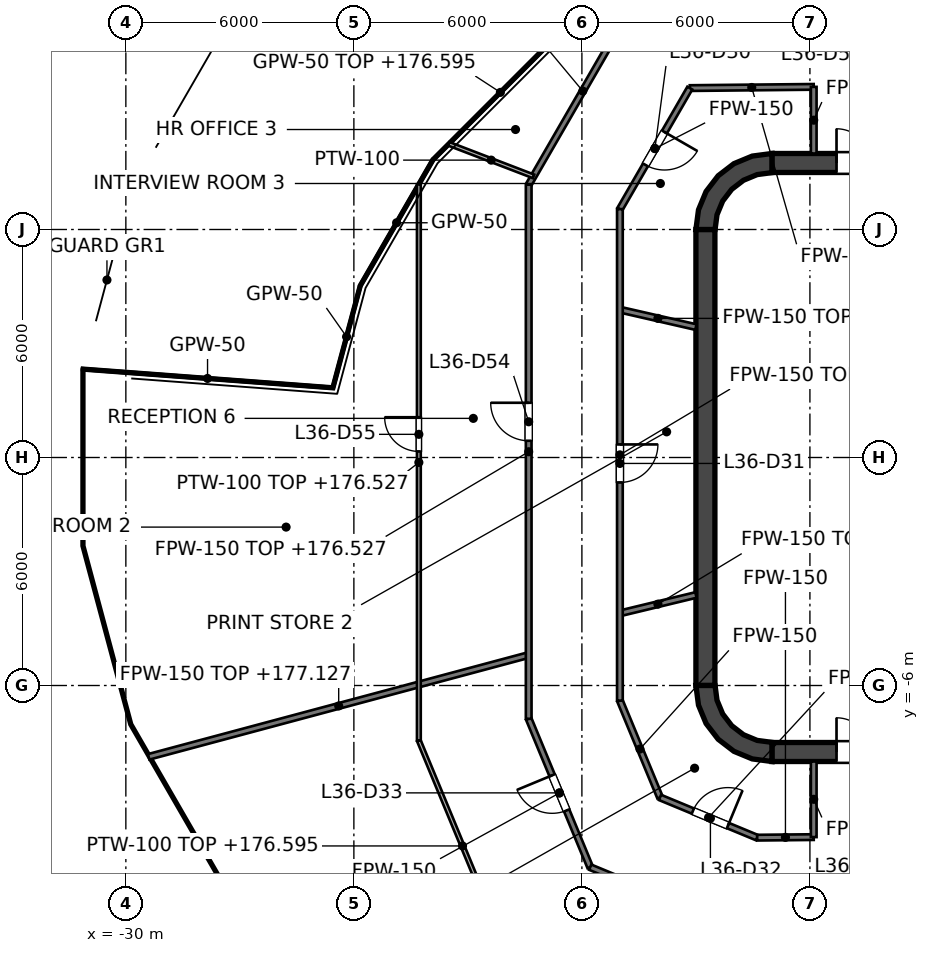
"""IFC4 building model, lengths in metres.
Left out: names, types, materials, properties, quantities, classifications, styles, units other than length and angle.
Written with IfcOpenShell. Run it as: python <this file> out.ifc"""

import sys

from ifc_helpers import new_model, si_unit, direction, frame, frame_2d, origin, place, context, subcontext, project, spatial, polyline, rectangle, outline, extrude, element, fill, save


model = new_model("IFC4")
c1 = context("Model", 3, precision=1e-05, world=origin(), true_north=direction((0.0, 1.0)))
c2 = subcontext(c1, "Body", "Model", "MODEL_VIEW")
j1 = project(units=[si_unit("LENGTHUNIT", "METRE"), si_unit("PLANEANGLEUNIT", "RADIAN")], contexts=[c1])
p1 = place(None, origin())
s1 = spatial("IfcSite", under=j1, at=p1, CompositionType="ELEMENT")
p2 = place(p1, origin())
s2 = spatial("IfcBuilding", under=s1, at=p2, CompositionType="ELEMENT")
p3 = place(p2, frame((0.0, 0.0, 173.6)))
s3 = spatial("IfcBuildingStorey", under=s2, at=p3, CompositionType="ELEMENT", Elevation=173.6)
p4 = place(p3, frame((-13.0, 7.75, 0.0), z_axis=(0.0, 0.0, 1.0), x_axis=(1.0, 0.0, 0.0)))
e1 = element("IfcWall", 1, at=p4, inside=s3, PredefinedType="SHEAR", context=c2, shape_type="SweptSolid", body=[
    extrude(rectangle(XDim=26.0, YDim=0.5, at=frame_2d((13.0, 0.0))), origin(), (0.0, 0.0, 1.0), 4.0),
])
p5 = place(p4, frame((1.7, 0.0, 0.0)))
e2 = element("IfcOpeningElement", 2, at=p5, cuts=e1, PredefinedType="OPENING", context=c2, shape_type="SweptSolid", body=[
    extrude(rectangle(XDim=1.8, YDim=2.1, at=frame_2d((0.9, 1.05))), frame((0.0, 0.25, 0.0), z_axis=(0.0, -1.0, 0.0), x_axis=(1.0, 0.0, 0.0)), (0.0, 0.0, 1.0), 0.5),
])
p6 = place(p4, frame((22.5, 0.0, 0.0)))
e3 = element("IfcOpeningElement", 3, at=p6, cuts=e1, PredefinedType="OPENING", context=c2, shape_type="SweptSolid", body=[
    extrude(rectangle(XDim=1.8, YDim=2.1, at=frame_2d((0.9, 1.05))), frame((0.0, 0.25, 0.0), z_axis=(0.0, -1.0, 0.0), x_axis=(1.0, 0.0, 0.0)), (0.0, 0.0, 1.0), 0.5),
])
p7 = place(p3, frame((-13.0, -7.75, 0.0), z_axis=(0.0, 0.0, 1.0), x_axis=(1.0, 0.0, 0.0)))
e4 = element("IfcWall", 4, at=p7, inside=s3, PredefinedType="SHEAR", context=c2, shape_type="SweptSolid", body=[
    extrude(rectangle(XDim=26.0, YDim=0.5, at=frame_2d((13.0, 0.0))), origin(), (0.0, 0.0, 1.0), 4.0),
])
p8 = place(p7, frame((1.7, 0.0, 0.0)))
e5 = element("IfcOpeningElement", 5, at=p8, cuts=e4, PredefinedType="OPENING", context=c2, shape_type="SweptSolid", body=[
    extrude(rectangle(XDim=1.8, YDim=2.1, at=frame_2d((0.9, 1.05))), frame((0.0, 0.25, 0.0), z_axis=(0.0, -1.0, 0.0), x_axis=(1.0, 0.0, 0.0)), (0.0, 0.0, 1.0), 0.5),
])
p9 = place(p7, frame((22.5, 0.0, 0.0)))
e6 = element("IfcOpeningElement", 6, at=p9, cuts=e4, PredefinedType="OPENING", context=c2, shape_type="SweptSolid", body=[
    extrude(rectangle(XDim=1.8, YDim=2.1, at=frame_2d((0.9, 1.05))), frame((0.0, 0.25, 0.0), z_axis=(0.0, -1.0, 0.0), x_axis=(1.0, 0.0, 0.0)), (0.0, 0.0, 1.0), 0.5),
])
p10 = place(p3, frame((-14.75, -6.0, 0.0), z_axis=(0.0, 0.0, 1.0), x_axis=(0.0, 1.0, 0.0)))
e7 = element("IfcWall", 7, at=p10, inside=s3, PredefinedType="SHEAR", context=c2, shape_type="SweptSolid", body=[
    extrude(rectangle(XDim=12.0, YDim=0.5, at=frame_2d((6.0, 0.0))), origin(), (0.0, 0.0, 1.0), 4.0),
])
p11 = place(p3, origin())
e8 = element("IfcWall", 8, at=p11, inside=s3, PredefinedType="SHEAR", context=c2, shape_type="SweptSolid", body=[
    extrude(outline(polyline([(-15.0, 6.0), (-14.496, 6.0), (-14.445, 6.387), (-14.295, 6.748), (-14.058, 7.058), (-13.748, 7.295), (-13.387, 7.445), (-13.0, 7.496), (-13.0, 8.0), (-13.518, 7.932), (-14.0, 7.732), (-14.414, 7.414), (-14.732, 7.0), (-14.932, 6.518), (-15.0, 6.0)])), origin(), (0.0, 0.0, 1.0), 4.0),
])
e9 = element("IfcWall", 9, at=p11, inside=s3, PredefinedType="SHEAR", context=c2, shape_type="SweptSolid", body=[
    extrude(outline(polyline([(-13.0, -8.0), (-13.0, -7.496), (-13.387, -7.445), (-13.748, -7.295), (-14.058, -7.058), (-14.295, -6.748), (-14.445, -6.387), (-14.496, -6.0), (-15.0, -6.0), (-14.932, -6.518), (-14.732, -7.0), (-14.414, -7.414), (-14.0, -7.732), (-13.518, -7.932), (-13.0, -8.0)])), origin(), (0.0, 0.0, 1.0), 4.0),
])
p12 = place(p3, frame((-11.8, -7.5, 0.0), z_axis=(0.0, 0.0, 1.0), x_axis=(0.0, 1.0, 0.0)))
e10 = element("IfcWall", 10, at=p12, inside=s3, PredefinedType="SOLIDWALL", context=c2, shape_type="SweptSolid", body=[
    extrude(rectangle(XDim=15.0, YDim=0.4, at=frame_2d((7.5, 0.0))), origin(), (0.0, 0.0, 1.0), 3.85),
])
p13 = place(p12, frame((11.3, 0.0, 0.0)))
e11 = element("IfcOpeningElement", 11, at=p13, cuts=e10, PredefinedType="OPENING", context=c2, shape_type="SweptSolid", body=[
    extrude(rectangle(XDim=1.1, YDim=2.1, at=frame_2d((0.55, 1.05))), frame((0.0, 0.2, 0.0), z_axis=(0.0, -1.0, 0.0), x_axis=(1.0, 0.0, 0.0)), (0.0, 0.0, 1.0), 0.4),
])
p14 = place(p12, frame((8.4, 0.0, 0.0)))
e12 = element("IfcOpeningElement", 12, at=p14, cuts=e10, PredefinedType="OPENING", context=c2, shape_type="SweptSolid", body=[
    extrude(rectangle(XDim=1.1, YDim=2.1, at=frame_2d((0.55, 1.05))), frame((0.0, 0.2, 0.0), z_axis=(0.0, -1.0, 0.0), x_axis=(1.0, 0.0, 0.0)), (0.0, 0.0, 1.0), 0.4),
])
p15 = place(p12, frame((5.5, 0.0, 0.0)))
e13 = element("IfcOpeningElement", 13, at=p15, cuts=e10, PredefinedType="OPENING", context=c2, shape_type="SweptSolid", body=[
    extrude(rectangle(XDim=1.1, YDim=2.1, at=frame_2d((0.55, 1.05))), frame((0.0, 0.2, 0.0), z_axis=(0.0, -1.0, 0.0), x_axis=(1.0, 0.0, 0.0)), (0.0, 0.0, 1.0), 0.4),
])
p16 = place(p12, frame((13.697, 0.0, 0.0)))
e14 = element("IfcOpeningElement", 14, at=p16, cuts=e10, PredefinedType="OPENING", context=c2, shape_type="SweptSolid", body=[
    extrude(rectangle(XDim=0.9, YDim=2.1, at=frame_2d((0.45, 1.05))), frame((0.0, 0.2, 0.0), z_axis=(0.0, -1.0, 0.0), x_axis=(1.0, 0.0, 0.0)), (0.0, 0.0, 1.0), 0.4),
])
p17 = place(p12, frame((0.403, 0.0, 0.0)))
e15 = element("IfcOpeningElement", 15, at=p17, cuts=e10, PredefinedType="OPENING", context=c2, shape_type="SweptSolid", body=[
    extrude(rectangle(XDim=0.9, YDim=2.1, at=frame_2d((0.45, 1.05))), frame((0.0, 0.2, 0.0), z_axis=(0.0, -1.0, 0.0), x_axis=(1.0, 0.0, 0.0)), (0.0, 0.0, 1.0), 0.4),
])
e16 = element("IfcWall", 16, at=p11, inside=s3, PredefinedType="SOLIDWALL", context=c2, shape_type="SweptSolid", body=[
    extrude(outline(polyline([(-12.0, -5.925), (-12.0, -5.675), (-14.25, -5.675), (-14.25, -3.025), (-12.0, -3.025), (-12.0, -2.775), (-14.25, -2.775), (-14.25, -0.125), (-12.0, -0.125), (-12.0, 0.125), (-14.25, 0.125), (-14.25, 2.775), (-12.0, 2.775), (-12.0, 3.025), (-14.25, 3.025), (-14.25, 5.675), (-12.0, 5.675), (-12.0, 5.925), (-14.25, 5.925), (-14.5, 5.925), (-14.5, 5.675), (-14.5, 3.025), (-14.5, 2.775), (-14.5, 0.125), (-14.5, -0.125), (-14.5, -2.775), (-14.5, -3.025), (-14.5, -5.675), (-14.5, -5.925), (-14.25, -5.925), (-12.0, -5.925)])), origin(), (0.0, 0.0, 1.0), 3.85),
])
p18 = place(p3, frame((-19.4, -6.876, 0.0), z_axis=(0.0, 0.0, 1.0), x_axis=(0.382843135608, -0.92381336509, 0.0)))
e17 = element("IfcWall", 17, at=p18, inside=s3, PredefinedType="PARTITIONING", context=c2, shape_type="SweptSolid", body=[
    extrude(rectangle(XDim=4.227, YDim=0.15, at=frame_2d((2.114, 0.0))), origin(), (0.0, 0.0, 1.0), 2.995),
])
p19 = place(p18, frame((1.61, 0.0, 0.0)))
e18 = element("IfcOpeningElement", 18, at=p19, cuts=e17, PredefinedType="OPENING", context=c2, shape_type="SweptSolid", body=[
    extrude(rectangle(XDim=1.0, YDim=2.1, at=frame_2d((0.5, 1.05))), frame((0.0, 0.075, 0.0), z_axis=(0.0, -1.0, 0.0), x_axis=(1.0, 0.0, 0.0)), (0.0, 0.0, 1.0), 0.15),
])
p20 = place(p3, frame((-17.0, -6.398, 0.0), z_axis=(0.0, 0.0, 1.0), x_axis=(0.382828866893, -0.923819278146, 0.0)))
e19 = element("IfcWall", 19, at=p20, inside=s3, PredefinedType="PARTITIONING", context=c2, shape_type="SweptSolid", body=[
    extrude(rectangle(XDim=2.757, YDim=0.15, at=frame_2d((1.378, 0.0))), origin(), (0.0, 0.0, 1.0), 2.995),
])
p21 = place(p3, frame((-17.781, -10.781, 0.0), z_axis=(0.0, 0.0, 1.0), x_axis=(0.923785728675, -0.3829098164, 0.0)))
e20 = element("IfcWall", 20, at=p21, inside=s3, PredefinedType="PARTITIONING", context=c2, shape_type="SweptSolid", body=[
    extrude(rectangle(XDim=4.25, YDim=0.15, at=frame_2d((2.125, 0.0))), origin(), (0.0, 0.0, 1.0), 2.995),
])
p22 = place(p3, frame((-15.945, -8.945, 0.0), z_axis=(0.0, 0.0, 1.0), x_axis=(0.92378777743, -0.382904873658, 0.0)))
e21 = element("IfcWall", 21, at=p22, inside=s3, PredefinedType="PARTITIONING", context=c2, shape_type="SweptSolid", body=[
    extrude(rectangle(XDim=2.768, YDim=0.15, at=frame_2d((1.384, 0.0))), origin(), (0.0, 0.0, 1.0), 2.995),
])
p23 = place(p22, frame((0.936, 0.0, 0.0)))
e22 = element("IfcOpeningElement", 22, at=p23, cuts=e21, PredefinedType="OPENING", context=c2, shape_type="SweptSolid", body=[
    extrude(rectangle(XDim=1.0, YDim=2.1, at=frame_2d((0.5, 1.05))), frame((0.0, 0.075, 0.0), z_axis=(0.0, -1.0, 0.0), x_axis=(1.0, 0.0, 0.0)), (0.0, 0.0, 1.0), 0.15),
])
p24 = place(p3, frame((-17.0, 3.89, 0.0), z_axis=(0.0, 0.0, 1.0), x_axis=(0.974792736312, -0.223112351146, 0.0)))
e23 = element("IfcWall", 23, at=p24, inside=s3, PredefinedType="PARTITIONING", context=c2, shape_type="SweptSolid", body=[
    extrude(rectangle(XDim=2.052, YDim=0.15, at=frame_2d((1.026, 0.0))), origin(), (0.0, 0.0, 1.0), 2.927),
])
p25 = place(p3, frame((-13.388, -10.004, 0.0), z_axis=(0.0, 0.0, 1.0), x_axis=(0.999951550029, 0.009843657588, 0.0)))
e24 = element("IfcWall", 24, at=p25, inside=s3, PredefinedType="PARTITIONING", context=c2, shape_type="SweptSolid", body=[
    extrude(rectangle(XDim=1.488, YDim=0.15, at=frame_2d((0.744, 0.0))), origin(), (0.0, 0.0, 1.0), 2.995),
])
p26 = place(p3, frame((-15.161, 9.721, 0.0), z_axis=(0.0, 0.0, 1.0), x_axis=(0.999950429518, 0.009956832157, 0.0)))
e25 = element("IfcWall", 25, at=p26, inside=s3, PredefinedType="PARTITIONING", context=c2, shape_type="SweptSolid", body=[
    extrude(rectangle(XDim=3.261, YDim=0.15, at=frame_2d((1.631, 0.0))), origin(), (0.0, 0.0, 1.0), 2.995),
])
p27 = place(p3, frame((-17.0, -4.101, 0.0), z_axis=(0.0, 0.0, 1.0), x_axis=(0.972092474047, 0.234598000634, 0.0)))
e26 = element("IfcWall", 26, at=p27, inside=s3, PredefinedType="PARTITIONING", context=c2, shape_type="SweptSolid", body=[
    extrude(rectangle(XDim=2.057, YDim=0.15, at=frame_2d((1.029, 0.0))), origin(), (0.0, 0.0, 1.0), 2.927),
])
p28 = place(p3, frame((-29.399, -7.877, 0.0), z_axis=(0.0, 0.0, 1.0), x_axis=(0.965938367102, 0.258772237617, 0.0)))
e27 = element("IfcWall", 27, at=p28, inside=s3, PredefinedType="PARTITIONING", context=c2, shape_type="SweptSolid", body=[
    extrude(rectangle(XDim=10.352, YDim=0.15, at=frame_2d((5.176, 0.0))), origin(), (0.0, 0.0, 1.0), 3.527),
])
p29 = place(p3, frame((-17.0, 6.536, 0.0), z_axis=(0.0, 0.0, 1.0), x_axis=(0.500251054866, 0.865880408662, 0.0)))
e28 = element("IfcWall", 28, at=p29, inside=s3, PredefinedType="PARTITIONING", context=c2, shape_type="SweptSolid", body=[
    extrude(rectangle(XDim=3.678, YDim=0.15, at=frame_2d((1.839, 0.0))), origin(), (0.0, 0.0, 1.0), 2.995),
])
p30 = place(p29, frame((1.344, 0.0, 0.0)))
e29 = element("IfcOpeningElement", 29, at=p30, cuts=e28, PredefinedType="OPENING", context=c2, shape_type="SweptSolid", body=[
    extrude(rectangle(XDim=1.0, YDim=2.1, at=frame_2d((0.5, 1.05))), frame((0.0, 0.075, 0.0), z_axis=(0.0, -1.0, 0.0), x_axis=(1.0, 0.0, 0.0)), (0.0, 0.0, 1.0), 0.15),
])
p31 = place(p3, frame((-19.4, 7.179, 0.0), z_axis=(0.0, 0.0, 1.0), x_axis=(0.500222556585, 0.865896872545, 0.0)))
e30 = element("IfcWall", 30, at=p31, inside=s3, PredefinedType="PARTITIONING", context=c2, shape_type="SweptSolid", body=[
    extrude(rectangle(XDim=5.69, YDim=0.15, at=frame_2d((2.845, 0.0))), origin(), (0.0, 0.0, 1.0), 2.995),
])
p32 = place(p3, frame((-11.9, -9.989, 0.0), z_axis=(0.0, 0.0, 1.0), x_axis=(0.0, 1.0, 0.0)))
e31 = element("IfcWall", 31, at=p32, inside=s3, PredefinedType="PARTITIONING", context=c2, shape_type="SweptSolid", body=[
    extrude(rectangle(XDim=1.989, YDim=0.15, at=frame_2d((0.995, 0.0))), origin(), (0.0, 0.0, 1.0), 2.995),
])
p33 = place(p3, frame((-11.9, 8.0, 0.0), z_axis=(0.0, 0.0, 1.0), x_axis=(0.0, 1.0, 0.0)))
e32 = element("IfcWall", 32, at=p33, inside=s3, PredefinedType="PARTITIONING", context=c2, shape_type="SweptSolid", body=[
    extrude(rectangle(XDim=1.753, YDim=0.15, at=frame_2d((0.876, 0.0))), origin(), (0.0, 0.0, 1.0), 2.995),
])
p34 = place(p3, frame((-17.0, -6.398, 0.0), z_axis=(0.0, 0.0, 1.0), x_axis=(0.0, 1.0, 0.0)))
e33 = element("IfcWall", 33, at=p34, inside=s3, PredefinedType="PARTITIONING", context=c2, shape_type="SweptSolid", body=[
    extrude(rectangle(XDim=12.934, YDim=0.15, at=frame_2d((6.467, 0.0))), origin(), (0.0, 0.0, 1.0), 2.927),
])
p35 = place(p34, frame((5.742, 0.0, 0.0)))
e34 = element("IfcOpeningElement", 34, at=p35, cuts=e33, PredefinedType="OPENING", context=c2, shape_type="SweptSolid", body=[
    extrude(rectangle(XDim=1.0, YDim=2.1, at=frame_2d((0.5, 1.05))), frame((0.0, 0.075, 0.0), z_axis=(0.0, -1.0, 0.0), x_axis=(1.0, 0.0, 0.0)), (0.0, 0.0, 1.0), 0.15),
])
p36 = place(p3, frame((-19.4, -6.876, 0.0), z_axis=(0.0, 0.0, 1.0), x_axis=(0.0, 1.0, 0.0)))
e35 = element("IfcWall", 35, at=p36, inside=s3, PredefinedType="PARTITIONING", context=c2, shape_type="SweptSolid", body=[
    extrude(rectangle(XDim=14.055, YDim=0.15, at=frame_2d((7.027, 0.0))), origin(), (0.0, 0.0, 1.0), 2.927),
])
p37 = place(p36, frame((7.316, 0.0, 0.0)))
e36 = element("IfcOpeningElement", 36, at=p37, cuts=e35, PredefinedType="OPENING", context=c2, shape_type="SweptSolid", body=[
    extrude(rectangle(XDim=1.0, YDim=2.1, at=frame_2d((0.5, 1.05))), frame((0.0, 0.075, 0.0), z_axis=(0.0, -1.0, 0.0), x_axis=(1.0, 0.0, 0.0)), (0.0, 0.0, 1.0), 0.15),
])
p38 = place(p3, frame((-31.149, 2.327, 0.0), z_axis=(0.0, 0.0, 1.0), x_axis=(0.997220120726, -0.074511950844, 0.0)))
e37 = element("IfcWall", 37, at=p38, inside=s3, PredefinedType="PARTITIONING", context=c2, shape_type="SweptSolid", body=[
    extrude(rectangle(XDim=6.615, YDim=0.05, at=frame_2d((3.308, 0.0))), origin(), (0.0, 0.0, 1.0), 2.927),
])
p39 = place(p3, frame((-21.919, 7.834, 0.0), z_axis=(0.0, 0.0, 1.0), x_axis=(0.707082452305, 0.707131109231, 0.0)))
e38 = element("IfcWall", 38, at=p39, inside=s3, PredefinedType="PARTITIONING", context=c2, shape_type="SweptSolid", body=[
    extrude(rectangle(XDim=5.018, YDim=0.05, at=frame_2d((2.509, 0.0))), origin(), (0.0, 0.0, 1.0), 2.995),
])
p40 = place(p3, frame((-23.832, 4.52, 0.0), z_axis=(0.0, 0.0, 1.0), x_axis=(0.499878937759, 0.866095287821, 0.0)))
e39 = element("IfcWall", 39, at=p40, inside=s3, PredefinedType="PARTITIONING", context=c2, shape_type="SweptSolid", body=[
    extrude(rectangle(XDim=3.827, YDim=0.05, at=frame_2d((1.913, 0.0))), origin(), (0.0, 0.0, 1.0), 2.927),
])
p41 = place(p3, frame((-24.552, 1.834, 0.0), z_axis=(0.0, 0.0, 1.0), x_axis=(0.258902839264, 0.965903369815, 0.0)))
e40 = element("IfcWall", 40, at=p41, inside=s3, PredefinedType="PARTITIONING", context=c2, shape_type="SweptSolid", body=[
    extrude(rectangle(XDim=2.781, YDim=0.05, at=frame_2d((1.39, 0.0))), origin(), (0.0, 0.0, 1.0), 2.927),
])
p42 = place(p3, frame((-22.29, -7.451, 0.0), z_axis=(0.0, 0.0, 1.0), x_axis=(0.38290406786, -0.923788111428, 0.0)))
e41 = element("IfcWall", 41, at=p42, inside=s3, PredefinedType="PARTITIONING", context=c2, shape_type="SweptSolid", body=[
    extrude(rectangle(XDim=5.999, YDim=0.1, at=frame_2d((3.0, 0.0))), origin(), (0.0, 0.0, 1.0), 2.995),
])
p43 = place(p3, frame((-21.5, 8.253, 0.0), z_axis=(0.0, 0.0, 1.0), x_axis=(0.933566994355, -0.358402939512, 0.0)))
e42 = element("IfcWall", 42, at=p43, inside=s3, PredefinedType="PARTITIONING", context=c2, shape_type="SweptSolid", body=[
    extrude(rectangle(XDim=2.385, YDim=0.1, at=frame_2d((1.193, 0.0))), origin(), (0.0, 0.0, 1.0), 3.85),
])
p44 = place(p3, frame((-22.29, -7.451, 0.0), z_axis=(0.0, 0.0, 1.0), x_axis=(0.0, 1.0, 0.0)))
e43 = element("IfcWall", 43, at=p44, inside=s3, PredefinedType="PARTITIONING", context=c2, shape_type="SweptSolid", body=[
    extrude(rectangle(XDim=14.642, YDim=0.1, at=frame_2d((7.321, 0.0))), origin(), (0.0, 0.0, 1.0), 2.927),
])
p45 = place(p44, frame((7.611, 0.0, 0.0)))
e44 = element("IfcOpeningElement", 44, at=p45, cuts=e43, PredefinedType="OPENING", context=c2, shape_type="SweptSolid", body=[
    extrude(rectangle(XDim=0.9, YDim=2.1, at=frame_2d((0.45, 1.05))), frame((0.0, 0.05, 0.0), z_axis=(0.0, -1.0, 0.0), x_axis=(1.0, 0.0, 0.0)), (0.0, 0.0, 1.0), 0.1),
])
p46 = place(p13, origin())
e45 = element("IfcDoor", 45, at=p46, inside=s3, OperationType="DOUBLE_DOOR_SLIDING", PredefinedType="DOOR", context=c2, shape_type="SweptSolid", body=[
    extrude(rectangle(XDim=1.1, YDim=2.1, at=frame_2d((0.55, 1.05))), frame((0.0, 0.025, 0.0), z_axis=(0.0, -1.0, 0.0), x_axis=(1.0, 0.0, 0.0)), (0.0, 0.0, 1.0), 0.05),
])
fill(e11, e45)
p47 = place(p14, origin())
e46 = element("IfcDoor", 46, at=p47, inside=s3, OperationType="DOUBLE_DOOR_SLIDING", PredefinedType="DOOR", context=c2, shape_type="SweptSolid", body=[
    extrude(rectangle(XDim=1.1, YDim=2.1, at=frame_2d((0.55, 1.05))), frame((0.0, 0.025, 0.0), z_axis=(0.0, -1.0, 0.0), x_axis=(1.0, 0.0, 0.0)), (0.0, 0.0, 1.0), 0.05),
])
fill(e12, e46)
p48 = place(p15, origin())
e47 = element("IfcDoor", 47, at=p48, inside=s3, OperationType="DOUBLE_DOOR_SLIDING", PredefinedType="DOOR", context=c2, shape_type="SweptSolid", body=[
    extrude(rectangle(XDim=1.1, YDim=2.1, at=frame_2d((0.55, 1.05))), frame((0.0, 0.025, 0.0), z_axis=(0.0, -1.0, 0.0), x_axis=(1.0, 0.0, 0.0)), (0.0, 0.0, 1.0), 0.05),
])
fill(e13, e47)
p49 = place(p16, origin())
e48 = element("IfcDoor", 48, at=p49, inside=s3, OperationType="SINGLE_SWING_LEFT", PredefinedType="DOOR", context=c2, shape_type="SweptSolid", body=[
    extrude(rectangle(XDim=0.9, YDim=2.1, at=frame_2d((0.45, 1.05))), frame((0.0, 0.025, 0.0), z_axis=(0.0, -1.0, 0.0), x_axis=(1.0, 0.0, 0.0)), (0.0, 0.0, 1.0), 0.05),
])
fill(e14, e48)
p50 = place(p17, origin())
e49 = element("IfcDoor", 49, at=p50, inside=s3, OperationType="SINGLE_SWING_LEFT", PredefinedType="DOOR", context=c2, shape_type="SweptSolid", body=[
    extrude(rectangle(XDim=0.9, YDim=2.1, at=frame_2d((0.45, 1.05))), frame((0.0, 0.025, 0.0), z_axis=(0.0, -1.0, 0.0), x_axis=(1.0, 0.0, 0.0)), (0.0, 0.0, 1.0), 0.05),
])
fill(e15, e49)
p51 = place(p5, origin())
e50 = element("IfcDoor", 50, at=p51, inside=s3, OperationType="DOUBLE_DOOR_SINGLE_SWING", PredefinedType="DOOR", context=c2, shape_type="SweptSolid", body=[
    extrude(rectangle(XDim=1.8, YDim=2.1, at=frame_2d((0.9, 1.05))), frame((0.0, 0.025, 0.0), z_axis=(0.0, -1.0, 0.0), x_axis=(1.0, 0.0, 0.0)), (0.0, 0.0, 1.0), 0.05),
])
fill(e2, e50)
p52 = place(p8, origin())
e51 = element("IfcDoor", 51, at=p52, inside=s3, OperationType="DOUBLE_DOOR_SINGLE_SWING", PredefinedType="DOOR", context=c2, shape_type="SweptSolid", body=[
    extrude(rectangle(XDim=1.8, YDim=2.1, at=frame_2d((0.9, 1.05))), frame((0.0, 0.025, 0.0), z_axis=(0.0, -1.0, 0.0), x_axis=(1.0, 0.0, 0.0)), (0.0, 0.0, 1.0), 0.05),
])
fill(e5, e51)
p53 = place(p30, origin())
e52 = element("IfcDoor", 52, at=p53, inside=s3, OperationType="SINGLE_SWING_RIGHT", PredefinedType="DOOR", context=c2, shape_type="SweptSolid", body=[
    extrude(rectangle(XDim=1.0, YDim=2.1, at=frame_2d((0.5, 1.05))), frame((0.0, 0.025, 0.0), z_axis=(0.0, -1.0, 0.0), x_axis=(1.0, 0.0, 0.0)), (0.0, 0.0, 1.0), 0.05),
])
fill(e29, e52)
p54 = place(p35, origin())
e53 = element("IfcDoor", 53, at=p54, inside=s3, OperationType="SINGLE_SWING_RIGHT", PredefinedType="DOOR", context=c2, shape_type="SweptSolid", body=[
    extrude(rectangle(XDim=1.0, YDim=2.1, at=frame_2d((0.5, 1.05))), frame((0.0, 0.025, 0.0), z_axis=(0.0, -1.0, 0.0), x_axis=(1.0, 0.0, 0.0)), (0.0, 0.0, 1.0), 0.05),
])
fill(e34, e53)
p55 = place(p23, origin())
e54 = element("IfcDoor", 54, at=p55, inside=s3, OperationType="SINGLE_SWING_RIGHT", PredefinedType="DOOR", context=c2, shape_type="SweptSolid", body=[
    extrude(rectangle(XDim=1.0, YDim=2.1, at=frame_2d((0.5, 1.05))), frame((0.0, 0.025, 0.0), z_axis=(0.0, -1.0, 0.0), x_axis=(1.0, 0.0, 0.0)), (0.0, 0.0, 1.0), 0.05),
])
fill(e22, e54)
p56 = place(p19, origin())
e55 = element("IfcDoor", 55, at=p56, inside=s3, OperationType="SINGLE_SWING_LEFT", PredefinedType="DOOR", context=c2, shape_type="SweptSolid", body=[
    extrude(rectangle(XDim=1.0, YDim=2.1, at=frame_2d((0.5, 1.05))), frame((0.0, 0.025, 0.0), z_axis=(0.0, -1.0, 0.0), x_axis=(1.0, 0.0, 0.0)), (0.0, 0.0, 1.0), 0.05),
])
fill(e18, e55)
p57 = place(p37, origin())
e56 = element("IfcDoor", 56, at=p57, inside=s3, OperationType="SINGLE_SWING_RIGHT", PredefinedType="DOOR", context=c2, shape_type="SweptSolid", body=[
    extrude(rectangle(XDim=1.0, YDim=2.1, at=frame_2d((0.5, 1.05))), frame((0.0, 0.025, 0.0), z_axis=(0.0, -1.0, 0.0), x_axis=(1.0, 0.0, 0.0)), (0.0, 0.0, 1.0), 0.05),
])
fill(e36, e56)
p58 = place(p45, origin())
e57 = element("IfcDoor", 57, at=p58, inside=s3, OperationType="SINGLE_SWING_RIGHT", PredefinedType="DOOR", context=c2, shape_type="SweptSolid", body=[
    extrude(rectangle(XDim=0.9, YDim=2.1, at=frame_2d((0.45, 1.05))), frame((0.0, 0.025, 0.0), z_axis=(0.0, -1.0, 0.0), x_axis=(1.0, 0.0, 0.0)), (0.0, 0.0, 1.0), 0.05),
])
fill(e44, e57)
save(model, sys.argv[1])
